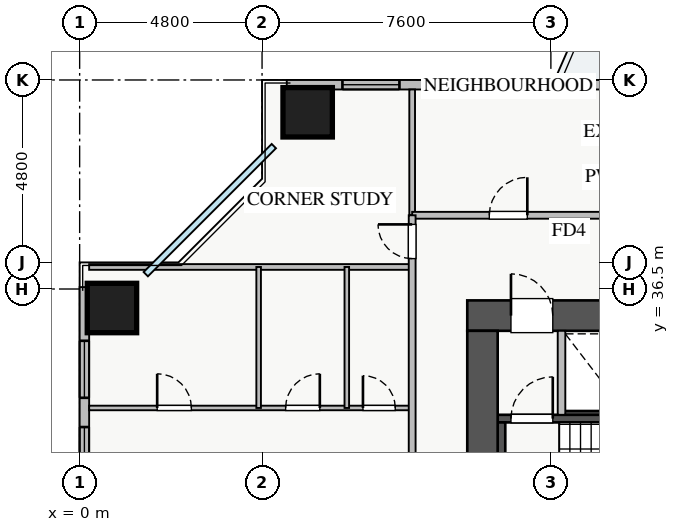
"""IFC4 building model, lengths in metres.
Left out: names, types, materials, properties, quantities, classifications, styles, units other than length and angle.
Written with IfcOpenShell. Run it as: python <this file> out.ifc"""

import sys

from ifc_helpers import new_model, si_unit, direction, frame, frame_2d, origin, origin_2d, place, context, subcontext, project, spatial, rectangle, extrude, source, transform, mapped, element, fill, save


model = new_model("IFC4")
c1 = context("Model", 3, precision=1e-05, world=origin(), true_north=direction((0.0, 1.0)))
c2 = subcontext(c1, "Body", "Model", "MODEL_VIEW")
j1 = project(units=[si_unit("LENGTHUNIT", "METRE"), si_unit("PLANEANGLEUNIT", "RADIAN")], contexts=[c1])
p1 = place(None, origin())
s1 = spatial("IfcSite", under=j1, at=p1, CompositionType="ELEMENT")
p2 = place(p1, origin())
s2 = spatial("IfcBuilding", under=s1, at=p2, CompositionType="ELEMENT")
p3 = place(p2, frame((0.0, 0.0, 66.5)))
s3 = spatial("IfcBuildingStorey", under=s2, at=p3, CompositionType="ELEMENT", Elevation=66.5)
p4 = place(p3, frame((12.68, 33.2, 0.0), z_axis=(0.0, 0.0, 1.0), x_axis=(1.0, 0.0, 0.0)))
e1 = element("IfcWall", 1, at=p4, inside=s3, PredefinedType="SHEAR", context=c2, shape_type="SweptSolid", body=[
    extrude(rectangle(XDim=1.94, YDim=0.18, at=frame_2d((0.97, 0.0))), origin(), (0.0, 0.0, 1.0), 3.07),
])
p5 = place(p3, frame((11.0, 33.09, 0.0), z_axis=(0.0, 0.0, 1.0), x_axis=(1.0, 0.0, 0.0)))
e2 = element("IfcWall", 2, at=p5, inside=s3, PredefinedType="SHEAR", context=c2, shape_type="SweptSolid", body=[
    extrude(rectangle(XDim=7.15, YDim=0.2, at=frame_2d((3.575, 0.0))), origin(), (0.0, 0.0, 1.0), 3.25),
])
p6 = place(p5, frame((0.35, 0.0, 0.0)))
e3 = element("IfcOpeningElement", 3, at=p6, cuts=e2, PredefinedType="OPENING", context=c2, shape_type="SweptSolid", body=[
    extrude(rectangle(XDim=1.1, YDim=2.05, at=frame_2d((0.55, 1.025))), frame((0.0, 0.11, 0.0), z_axis=(0.0, -1.0, 0.0), x_axis=(1.0, 0.0, 0.0)), (0.0, 0.0, 1.0), 0.22),
])
p7 = place(p3, frame((11.1, 30.05, 0.0), z_axis=(0.0, 0.0, 1.0), x_axis=(0.0, 1.0, 0.0)))
e4 = element("IfcWall", 4, at=p7, inside=s3, PredefinedType="SHEAR", context=c2, shape_type="SweptSolid", body=[
    extrude(rectangle(XDim=2.94, YDim=0.2, at=frame_2d((1.47, 0.0))), origin(), (0.0, 0.0, 1.0), 3.25),
])
p8 = place(p3, frame((10.2, 35.8, 0.0), z_axis=(0.0, 0.0, 1.0), x_axis=(1.0, 0.0, 0.0)))
e5 = element("IfcWall", 5, at=p8, inside=s3, PredefinedType="SHEAR", context=c2, shape_type="SweptSolid", body=[
    extrude(rectangle(XDim=17.6, YDim=0.8, at=frame_2d((8.8, 0.0))), origin(), (0.0, 0.0, 1.0), 3.25),
])
p9 = place(p8, frame((1.15, 0.0, 0.0)))
e6 = element("IfcOpeningElement", 6, at=p9, cuts=e5, PredefinedType="OPENING", context=c2, shape_type="SweptSolid", body=[
    extrude(rectangle(XDim=1.1, YDim=2.05, at=frame_2d((0.55, 1.025))), frame((0.0, 0.41, 0.0), z_axis=(0.0, -1.0, 0.0), x_axis=(1.0, 0.0, 0.0)), (0.0, 0.0, 1.0), 0.82),
])
p10 = place(p8, frame((8.3, 0.0, 0.0)))
e7 = element("IfcOpeningElement", 7, at=p10, cuts=e5, PredefinedType="OPENING", context=c2, shape_type="SweptSolid", body=[
    extrude(rectangle(XDim=1.1, YDim=2.05, at=frame_2d((0.55, 1.025))), frame((0.0, 0.41, 0.0), z_axis=(0.0, -1.0, 0.0), x_axis=(1.0, 0.0, 0.0)), (0.0, 0.0, 1.0), 0.82),
])
p11 = place(p8, frame((10.05, 0.0, 0.0)))
e8 = element("IfcOpeningElement", 8, at=p11, cuts=e5, PredefinedType="OPENING", context=c2, shape_type="SweptSolid", body=[
    extrude(rectangle(XDim=1.1, YDim=2.05, at=frame_2d((0.55, 1.025))), frame((0.0, 0.41, 0.0), z_axis=(0.0, -1.0, 0.0), x_axis=(1.0, 0.0, 0.0)), (0.0, 0.0, 1.0), 0.82),
])
p12 = place(p8, frame((14.74, 0.0, 0.0)))
e9 = element("IfcOpeningElement", 9, at=p12, cuts=e5, PredefinedType="OPENING", context=c2, shape_type="SweptSolid", body=[
    extrude(rectangle(XDim=1.0, YDim=2.05, at=frame_2d((0.5, 1.025))), frame((0.0, 0.41, 0.0), z_axis=(0.0, -1.0, 0.0), x_axis=(1.0, 0.0, 0.0)), (0.0, 0.0, 1.0), 0.82),
])
p13 = place(p8, frame((12.585, 0.0, 0.0)))
e10 = element("IfcOpeningElement", 10, at=p13, cuts=e5, PredefinedType="OPENING", context=c2, shape_type="SweptSolid", body=[
    extrude(rectangle(XDim=1.0, YDim=2.05, at=frame_2d((0.5, 1.025))), frame((0.0, 0.41, 0.0), z_axis=(0.0, -1.0, 0.0), x_axis=(1.0, 0.0, 0.0)), (0.0, 0.0, 1.0), 0.82),
])
p14 = place(p3, frame((10.6, 29.8, 0.0), z_axis=(0.0, 0.0, 1.0), x_axis=(0.0, 1.0, 0.0)))
e11 = element("IfcWall", 11, at=p14, inside=s3, PredefinedType="SHEAR", context=c2, shape_type="SweptSolid", body=[
    extrude(rectangle(XDim=5.6, YDim=0.8, at=frame_2d((2.8, 0.0))), origin(), (0.0, 0.0, 1.0), 3.25),
])
m1 = source(origin(), c2, "Body", "SweptSolid", [
    extrude(rectangle(XDim=1.3, YDim=1.3, at=origin_2d()), origin(), (0.0, 0.0, 1.0), 3.25),
])
for number, where, z_axis, x_axis in (
    (12, (6.0, 41.15, 0.0), (0.0, 0.0, 1.0), (1.0, 0.0, 0.0)),
    (13, (0.85, 36.0, 0.0), (0.0, 0.0, 1.0), (1.0, 0.0, 0.0)),
):
    element("IfcColumn", number, at=place(p3, frame(where, z_axis=z_axis, x_axis=x_axis)), inside=s3, PredefinedType="COLUMN", context=c2, shape_type="MappedRepresentation", body=[
        mapped(m1, transform((0.0, 0.0, 0.0), x_axis=(1.0, 0.0, 0.0), y_axis=(0.0, 1.0, 0.0), z_axis=(0.0, 0.0, 1.0), scale=1.0)),
    ])
p15 = place(p3, frame((5.45, 41.875, 0.0), z_axis=(0.0, 0.0, 1.0), x_axis=(1.0, 0.0, 0.0)))
e14 = element("IfcWall", 14, at=p15, inside=s3, PredefinedType="STANDARD", context=c2, shape_type="SweptSolid", body=[
    extrude(rectangle(XDim=27.1, YDim=0.25, at=frame_2d((13.55, 0.0))), origin(), (0.0, 0.0, 1.0), 2.61),
])
p16 = place(p15, frame((14.4, 0.0, 0.0)))
e15 = element("IfcOpeningElement", 15, at=p16, cuts=e14, PredefinedType="OPENING", context=c2, shape_type="SweptSolid", body=[
    extrude(rectangle(XDim=1.2, YDim=2.1, at=frame_2d((0.6, 1.05))), frame((0.0, 0.135, 0.0), z_axis=(0.0, -1.0, 0.0), x_axis=(1.0, 0.0, 0.0)), (0.0, 0.0, 1.0), 0.27),
])
p17 = place(p15, frame((1.465, 0.0, 0.9)))
e16 = element("IfcOpeningElement", 16, at=p17, cuts=e14, PredefinedType="OPENING", context=c2, shape_type="SweptSolid", body=[
    extrude(rectangle(XDim=1.5, YDim=1.5, at=frame_2d((0.75, 0.75))), frame((0.0, 0.135, 0.0), z_axis=(0.0, -1.0, 0.0), x_axis=(1.0, 0.0, 0.0)), (0.0, 0.0, 1.0), 0.27),
])
p18 = place(p15, frame((9.263, 0.0, 0.9)))
e17 = element("IfcOpeningElement", 17, at=p18, cuts=e14, PredefinedType="OPENING", context=c2, shape_type="SweptSolid", body=[
    extrude(rectangle(XDim=1.8, YDim=1.45, at=frame_2d((0.9, 0.725))), frame((0.0, 0.135, 0.0), z_axis=(0.0, -1.0, 0.0), x_axis=(1.0, 0.0, 0.0)), (0.0, 0.0, 1.0), 0.27),
])
p19 = place(p15, frame((17.93, 0.0, 0.9)))
e18 = element("IfcOpeningElement", 18, at=p19, cuts=e14, PredefinedType="OPENING", context=c2, shape_type="SweptSolid", body=[
    extrude(rectangle(XDim=1.5, YDim=1.5, at=frame_2d((0.75, 0.75))), frame((0.0, 0.135, 0.0), z_axis=(0.0, -1.0, 0.0), x_axis=(1.0, 0.0, 0.0)), (0.0, 0.0, 1.0), 0.27),
])
p20 = place(p15, frame((22.663, 0.0, 0.9)))
e19 = element("IfcOpeningElement", 19, at=p20, cuts=e14, PredefinedType="OPENING", context=c2, shape_type="SweptSolid", body=[
    extrude(rectangle(XDim=2.1, YDim=1.48, at=frame_2d((1.05, 0.74))), frame((0.0, 0.135, 0.0), z_axis=(0.0, -1.0, 0.0), x_axis=(1.0, 0.0, 0.0)), (0.0, 0.0, 1.0), 0.27),
])
p21 = place(p15, frame((4.63, 0.0, 0.9)))
e20 = element("IfcOpeningElement", 20, at=p21, cuts=e14, PredefinedType="OPENING", context=c2, shape_type="SweptSolid", body=[
    extrude(rectangle(XDim=2.4, YDim=1.5, at=frame_2d((1.2, 0.75))), frame((0.0, 0.135, 0.0), z_axis=(0.0, -1.0, 0.0), x_axis=(1.0, 0.0, 0.0)), (0.0, 0.0, 1.0), 0.27),
])
p22 = place(p3, frame((0.125, 9.45, 0.0), z_axis=(0.0, 0.0, 1.0), x_axis=(0.0, 1.0, 0.0)))
e21 = element("IfcWall", 21, at=p22, inside=s3, PredefinedType="STANDARD", context=c2, shape_type="SweptSolid", body=[
    extrude(rectangle(XDim=27.1, YDim=0.25, at=frame_2d((13.55, 0.0))), origin(), (0.0, 0.0, 1.0), 2.61),
])
p23 = place(p22, frame((14.4, 0.0, 0.0)))
e22 = element("IfcOpeningElement", 22, at=p23, cuts=e21, PredefinedType="OPENING", context=c2, shape_type="SweptSolid", body=[
    extrude(rectangle(XDim=1.2, YDim=2.1, at=frame_2d((0.6, 1.05))), frame((0.0, 0.135, 0.0), z_axis=(0.0, -1.0, 0.0), x_axis=(1.0, 0.0, 0.0)), (0.0, 0.0, 1.0), 0.27),
])
p24 = place(p22, frame((1.417, 0.0, 0.9)))
e23 = element("IfcOpeningElement", 23, at=p24, cuts=e21, PredefinedType="OPENING", context=c2, shape_type="SweptSolid", body=[
    extrude(rectangle(XDim=1.2, YDim=1.4, at=frame_2d((0.6, 0.7))), frame((0.0, 0.135, 0.0), z_axis=(0.0, -1.0, 0.0), x_axis=(1.0, 0.0, 0.0)), (0.0, 0.0, 1.0), 0.27),
])
p25 = place(p22, frame((24.188, 0.0, 0.9)))
e24 = element("IfcOpeningElement", 24, at=p25, cuts=e21, PredefinedType="OPENING", context=c2, shape_type="SweptSolid", body=[
    extrude(rectangle(XDim=1.5, YDim=1.5, at=frame_2d((0.75, 0.75))), frame((0.0, 0.135, 0.0), z_axis=(0.0, -1.0, 0.0), x_axis=(1.0, 0.0, 0.0)), (0.0, 0.0, 1.0), 0.27),
])
p26 = place(p22, frame((3.722, 0.0, 0.9)))
e25 = element("IfcOpeningElement", 25, at=p26, cuts=e21, PredefinedType="OPENING", context=c2, shape_type="SweptSolid", body=[
    extrude(rectangle(XDim=2.4, YDim=1.5, at=frame_2d((1.2, 0.75))), frame((0.0, 0.135, 0.0), z_axis=(0.0, -1.0, 0.0), x_axis=(1.0, 0.0, 0.0)), (0.0, 0.0, 1.0), 0.27),
])
p27 = place(p22, frame((21.018, 0.0, 0.9)))
e26 = element("IfcOpeningElement", 26, at=p27, cuts=e21, PredefinedType="OPENING", context=c2, shape_type="SweptSolid", body=[
    extrude(rectangle(XDim=2.4, YDim=1.5, at=frame_2d((1.2, 0.75))), frame((0.0, 0.135, 0.0), z_axis=(0.0, -1.0, 0.0), x_axis=(1.0, 0.0, 0.0)), (0.0, 0.0, 1.0), 0.27),
])
p28 = place(p22, frame((18.6, 0.0, 0.9)))
e27 = element("IfcOpeningElement", 27, at=p28, cuts=e21, PredefinedType="OPENING", context=c2, shape_type="SweptSolid", body=[
    extrude(rectangle(XDim=0.9, YDim=1.2, at=frame_2d((0.45, 0.6))), frame((0.0, 0.135, 0.0), z_axis=(0.0, -1.0, 0.0), x_axis=(1.0, 0.0, 0.0)), (0.0, 0.0, 1.0), 0.27),
])
p29 = place(p3, frame((12.68, 33.19, 0.0), z_axis=(0.0, 0.0, 1.0), x_axis=(0.0, 1.0, 0.0)))
e28 = element("IfcWall", 28, at=p29, inside=s3, PredefinedType="PARTITIONING", context=c2, shape_type="SweptSolid", body=[
    extrude(rectangle(XDim=2.21, YDim=0.2, at=frame_2d((1.105, 0.0))), origin(), (0.0, 0.0, 1.0), 3.07),
])
p30 = place(p3, frame((8.75, 38.44, 0.0), z_axis=(0.0, 0.0, 1.0), x_axis=(0.0, 1.0, 0.0)))
e29 = element("IfcWall", 29, at=p30, inside=s3, PredefinedType="PARTITIONING", context=c2, shape_type="SweptSolid", body=[
    extrude(rectangle(XDim=3.31, YDim=0.15, at=frame_2d((1.655, 0.0))), origin(), (0.0, 0.0, 1.0), 3.07),
])
p31 = place(p3, frame((8.75, 38.44, 0.0), z_axis=(0.0, 0.0, 1.0), x_axis=(1.0, 0.0, 0.0)))
e30 = element("IfcWall", 30, at=p31, inside=s3, PredefinedType="PARTITIONING", context=c2, shape_type="SweptSolid", body=[
    extrude(rectangle(XDim=23.61, YDim=0.18, at=frame_2d((11.805, 0.0))), origin(), (0.0, 0.0, 1.0), 3.07),
])
p32 = place(p31, frame((2.03, 0.0, 0.0)))
e31 = element("IfcOpeningElement", 31, at=p32, cuts=e30, PredefinedType="OPENING", context=c2, shape_type="SweptSolid", body=[
    extrude(rectangle(XDim=1.0, YDim=2.05, at=frame_2d((0.5, 1.025))), frame((0.0, 0.1, 0.0), z_axis=(0.0, -1.0, 0.0), x_axis=(1.0, 0.0, 0.0)), (0.0, 0.0, 1.0), 0.2),
])
p33 = place(p31, frame((8.555, 0.0, 0.0)))
e32 = element("IfcOpeningElement", 32, at=p33, cuts=e30, PredefinedType="OPENING", context=c2, shape_type="SweptSolid", body=[
    extrude(rectangle(XDim=1.0, YDim=2.05, at=frame_2d((0.5, 1.025))), frame((0.0, 0.1, 0.0), z_axis=(0.0, -1.0, 0.0), x_axis=(1.0, 0.0, 0.0)), (0.0, 0.0, 1.0), 0.2),
])
p34 = place(p31, frame((14.88, 0.0, 0.0)))
e33 = element("IfcOpeningElement", 33, at=p34, cuts=e30, PredefinedType="OPENING", context=c2, shape_type="SweptSolid", body=[
    extrude(rectangle(XDim=1.0, YDim=2.05, at=frame_2d((0.5, 1.025))), frame((0.0, 0.1, 0.0), z_axis=(0.0, -1.0, 0.0), x_axis=(1.0, 0.0, 0.0)), (0.0, 0.0, 1.0), 0.2),
])
p35 = place(p31, frame((20.16, 0.0, 0.0)))
e34 = element("IfcOpeningElement", 34, at=p35, cuts=e30, PredefinedType="OPENING", context=c2, shape_type="SweptSolid", body=[
    extrude(rectangle(XDim=1.0, YDim=2.05, at=frame_2d((0.5, 1.025))), frame((0.0, 0.1, 0.0), z_axis=(0.0, -1.0, 0.0), x_axis=(1.0, 0.0, 0.0)), (0.0, 0.0, 1.0), 0.2),
])
p36 = place(p3, frame((0.25, 37.08, 0.0), z_axis=(0.0, 0.0, 1.0), x_axis=(1.0, 0.0, 0.0)))
e35 = element("IfcWall", 35, at=p36, inside=s3, PredefinedType="PARTITIONING", context=c2, shape_type="SweptSolid", body=[
    extrude(rectangle(XDim=8.5, YDim=0.15, at=frame_2d((4.25, 0.0))), origin(), (0.0, 0.0, 1.0), 3.07),
])
p37 = place(p3, frame((0.25, 33.37, 0.0), z_axis=(0.0, 0.0, 1.0), x_axis=(1.0, 0.0, 0.0)))
e36 = element("IfcWall", 36, at=p37, inside=s3, PredefinedType="PLUMBINGWALL", context=c2, shape_type="SweptSolid", body=[
    extrude(rectangle(XDim=8.5, YDim=0.12, at=frame_2d((4.25, 0.0))), origin(), (0.0, 0.0, 1.0), 3.07),
])
p38 = place(p37, frame((1.79, 0.0, 0.0)))
e37 = element("IfcOpeningElement", 37, at=p38, cuts=e36, PredefinedType="OPENING", context=c2, shape_type="SweptSolid", body=[
    extrude(rectangle(XDim=0.9, YDim=2.05, at=frame_2d((0.45, 1.025))), frame((0.0, 0.07, 0.0), z_axis=(0.0, -1.0, 0.0), x_axis=(1.0, 0.0, 0.0)), (0.0, 0.0, 1.0), 0.14),
])
p39 = place(p37, frame((5.17, 0.0, 0.0)))
e38 = element("IfcOpeningElement", 38, at=p39, cuts=e36, PredefinedType="OPENING", context=c2, shape_type="SweptSolid", body=[
    extrude(rectangle(XDim=0.9, YDim=2.05, at=frame_2d((0.45, 1.025))), frame((0.0, 0.07, 0.0), z_axis=(0.0, -1.0, 0.0), x_axis=(1.0, 0.0, 0.0)), (0.0, 0.0, 1.0), 0.14),
])
p40 = place(p37, frame((7.205, 0.0, 0.0)))
e39 = element("IfcOpeningElement", 39, at=p40, cuts=e36, PredefinedType="OPENING", context=c2, shape_type="SweptSolid", body=[
    extrude(rectangle(XDim=0.85, YDim=2.05, at=frame_2d((0.425, 1.025))), frame((0.0, 0.07, 0.0), z_axis=(0.0, -1.0, 0.0), x_axis=(1.0, 0.0, 0.0)), (0.0, 0.0, 1.0), 0.14),
])
for number, where, z_axis, x_axis in (
    (40, (4.71, 33.37, 0.0), (0.0, 0.0, 1.0), (0.0, 1.0, 0.0)),
    (41, (7.03, 33.37, 0.0), (0.0, 0.0, 1.0), (0.0, 1.0, 0.0)),
):
    element("IfcWall", number, at=place(p3, frame(where, z_axis=z_axis, x_axis=x_axis)), inside=s3, PredefinedType="PLUMBINGWALL", context=c2, shape_type="SweptSolid", body=[
        extrude(rectangle(XDim=3.71, YDim=0.12, at=frame_2d((1.855, 0.0))), origin(), (0.0, 0.0, 1.0), 3.07),
    ])
p41 = place(p3, frame((8.75, 7.21, 0.0), z_axis=(0.0, 0.0, 1.0), x_axis=(0.0, 1.0, 0.0)))
e42 = element("IfcWall", 42, at=p41, inside=s3, PredefinedType="PARTITIONING", context=c2, shape_type="SweptSolid", body=[
    extrude(rectangle(XDim=31.23, YDim=0.18, at=frame_2d((15.615, 0.0))), origin(), (0.0, 0.0, 1.0), 3.07),
])
p42 = place(p41, frame((30.09, 0.0, 0.0)))
e43 = element("IfcOpeningElement", 43, at=p42, cuts=e42, PredefinedType="OPENING", context=c2, shape_type="SweptSolid", body=[
    extrude(rectangle(XDim=0.9, YDim=2.05, at=frame_2d((0.45, 1.025))), frame((0.0, 0.1, 0.0), z_axis=(0.0, -1.0, 0.0), x_axis=(1.0, 0.0, 0.0)), (0.0, 0.0, 1.0), 0.2),
])
p43 = place(p41, frame((0.24, 0.0, 0.0)))
e44 = element("IfcOpeningElement", 44, at=p43, cuts=e42, PredefinedType="OPENING", context=c2, shape_type="SweptSolid", body=[
    extrude(rectangle(XDim=0.9, YDim=2.05, at=frame_2d((0.45, 1.025))), frame((0.0, 0.1, 0.0), z_axis=(0.0, -1.0, 0.0), x_axis=(1.0, 0.0, 0.0)), (0.0, 0.0, 1.0), 0.2),
])
p44 = place(p41, frame((2.555, 0.0, 0.0)))
e45 = element("IfcOpeningElement", 45, at=p44, cuts=e42, PredefinedType="OPENING", context=c2, shape_type="SweptSolid", body=[
    extrude(rectangle(XDim=1.0, YDim=2.05, at=frame_2d((0.5, 1.025))), frame((0.0, 0.1, 0.0), z_axis=(0.0, -1.0, 0.0), x_axis=(1.0, 0.0, 0.0)), (0.0, 0.0, 1.0), 0.2),
])
p45 = place(p41, frame((11.91, 0.0, 0.0)))
e46 = element("IfcOpeningElement", 46, at=p45, cuts=e42, PredefinedType="OPENING", context=c2, shape_type="SweptSolid", body=[
    extrude(rectangle(XDim=1.0, YDim=2.05, at=frame_2d((0.5, 1.025))), frame((0.0, 0.1, 0.0), z_axis=(0.0, -1.0, 0.0), x_axis=(1.0, 0.0, 0.0)), (0.0, 0.0, 1.0), 0.2),
])
p46 = place(p41, frame((17.425, 0.0, 0.0)))
e47 = element("IfcOpeningElement", 47, at=p46, cuts=e42, PredefinedType="OPENING", context=c2, shape_type="SweptSolid", body=[
    extrude(rectangle(XDim=1.0, YDim=2.05, at=frame_2d((0.5, 1.025))), frame((0.0, 0.1, 0.0), z_axis=(0.0, -1.0, 0.0), x_axis=(1.0, 0.0, 0.0)), (0.0, 0.0, 1.0), 0.2),
])
p47 = place(p41, frame((23.76, 0.0, 0.0)))
e48 = element("IfcOpeningElement", 48, at=p47, cuts=e42, PredefinedType="OPENING", context=c2, shape_type="SweptSolid", body=[
    extrude(rectangle(XDim=1.0, YDim=2.05, at=frame_2d((0.5, 1.025))), frame((0.0, 0.1, 0.0), z_axis=(0.0, -1.0, 0.0), x_axis=(1.0, 0.0, 0.0)), (0.0, 0.0, 1.0), 0.2),
])
m2 = source(origin(), c2, "Body", "SweptSolid", [
    extrude(rectangle(XDim=1.5, YDim=1.5, at=frame_2d((0.75, 0.75))), frame((0.0, 0.03, 0.0), z_axis=(0.0, -1.0, 0.0), x_axis=(1.0, 0.0, 0.0)), (0.0, 0.0, 1.0), 0.06),
])
p48 = place(p17, origin())
e49 = element("IfcWindow", 49, at=p48, inside=s3, PartitioningType="TRIPLE_PANEL_VERTICAL", PredefinedType="WINDOW", context=c2, shape_type="MappedRepresentation", body=[
    mapped(m2, transform((0.0, 0.0, 0.0), x_axis=(1.0, 0.0, 0.0), y_axis=(0.0, 1.0, 0.0), z_axis=(0.0, 0.0, 1.0), scale=1.0)),
])
fill(e16, e49)
p49 = place(p25, origin())
e50 = element("IfcWindow", 50, at=p49, inside=s3, PartitioningType="TRIPLE_PANEL_VERTICAL", PredefinedType="WINDOW", context=c2, shape_type="MappedRepresentation", body=[
    mapped(m2, transform((0.0, 0.0, 0.0), x_axis=(1.0, 0.0, 0.0), y_axis=(0.0, 1.0, 0.0), z_axis=(0.0, 0.0, 1.0), scale=1.0)),
])
fill(e24, e50)
m3 = source(origin(), c2, "Body", "SweptSolid", [
    extrude(rectangle(XDim=1.1, YDim=2.05, at=frame_2d((0.55, 1.025))), frame((0.0, 0.025, 0.0), z_axis=(0.0, -1.0, 0.0), x_axis=(1.0, 0.0, 0.0)), (0.0, 0.0, 1.0), 0.05),
])
p50 = place(p9, origin())
e51 = element("IfcDoor", 51, at=p50, inside=s3, OperationType="SINGLE_SWING_LEFT", PredefinedType="DOOR", context=c2, shape_type="MappedRepresentation", body=[
    mapped(m3, transform((0.0, 0.0, 0.0), x_axis=(1.0, 0.0, 0.0), y_axis=(0.0, 1.0, 0.0), z_axis=(0.0, 0.0, 1.0), scale=1.0)),
])
fill(e6, e51)
p51 = place(p6, origin())
e52 = element("IfcDoor", 52, at=p51, inside=s3, OperationType="SINGLE_SWING_RIGHT", PredefinedType="DOOR", context=c2, shape_type="MappedRepresentation", body=[
    mapped(m3, transform((0.0, 0.0, 0.0), x_axis=(1.0, 0.0, 0.0), y_axis=(0.0, 1.0, 0.0), z_axis=(0.0, 0.0, 1.0), scale=1.0)),
])
fill(e3, e52)
m4 = source(origin(), c2, "Body", "SweptSolid", [
    extrude(rectangle(XDim=1.0, YDim=2.05, at=frame_2d((0.5, 1.025))), frame((0.0, 0.025, 0.0), z_axis=(0.0, -1.0, 0.0), x_axis=(1.0, 0.0, 0.0)), (0.0, 0.0, 1.0), 0.05),
])
p52 = place(p32, origin())
e53 = element("IfcDoor", 53, at=p52, inside=s3, OperationType="SINGLE_SWING_RIGHT", PredefinedType="DOOR", context=c2, shape_type="MappedRepresentation", body=[
    mapped(m4, transform((0.0, 0.0, 0.0), x_axis=(1.0, 0.0, 0.0), y_axis=(0.0, 1.0, 0.0), z_axis=(0.0, 0.0, 1.0), scale=1.0)),
])
fill(e31, e53)
m5 = source(origin(), c2, "Body", "SweptSolid", [
    extrude(rectangle(XDim=0.9, YDim=2.05, at=frame_2d((0.45, 1.025))), frame((0.0, 0.025, 0.0), z_axis=(0.0, -1.0, 0.0), x_axis=(1.0, 0.0, 0.0)), (0.0, 0.0, 1.0), 0.05),
])
p53 = place(p38, origin())
e54 = element("IfcDoor", 54, at=p53, inside=s3, OperationType="SINGLE_SWING_LEFT", PredefinedType="DOOR", context=c2, shape_type="MappedRepresentation", body=[
    mapped(m5, transform((0.0, 0.0, 0.0), x_axis=(1.0, 0.0, 0.0), y_axis=(0.0, 1.0, 0.0), z_axis=(0.0, 0.0, 1.0), scale=1.0)),
])
fill(e37, e54)
p54 = place(p39, origin())
e55 = element("IfcDoor", 55, at=p54, inside=s3, OperationType="SINGLE_SWING_RIGHT", PredefinedType="DOOR", context=c2, shape_type="MappedRepresentation", body=[
    mapped(m5, transform((0.0, 0.0, 0.0), x_axis=(1.0, 0.0, 0.0), y_axis=(0.0, 1.0, 0.0), z_axis=(0.0, 0.0, 1.0), scale=1.0)),
])
fill(e38, e55)
m6 = source(origin(), c2, "Body", "SweptSolid", [
    extrude(rectangle(XDim=0.85, YDim=2.05, at=frame_2d((0.425, 1.025))), frame((0.0, 0.025, 0.0), z_axis=(0.0, -1.0, 0.0), x_axis=(1.0, 0.0, 0.0)), (0.0, 0.0, 1.0), 0.05),
])
p55 = place(p40, origin())
e56 = element("IfcDoor", 56, at=p55, inside=s3, OperationType="SINGLE_SWING_LEFT", PredefinedType="DOOR", context=c2, shape_type="MappedRepresentation", body=[
    mapped(m6, transform((0.0, 0.0, 0.0), x_axis=(1.0, 0.0, 0.0), y_axis=(0.0, 1.0, 0.0), z_axis=(0.0, 0.0, 1.0), scale=1.0)),
])
fill(e39, e56)
p56 = place(p42, origin())
e57 = element("IfcDoor", 57, at=p56, inside=s3, OperationType="SINGLE_SWING_RIGHT", PredefinedType="DOOR", context=c2, shape_type="MappedRepresentation", body=[
    mapped(m5, transform((0.0, 0.0, 0.0), x_axis=(1.0, 0.0, 0.0), y_axis=(0.0, 1.0, 0.0), z_axis=(0.0, 0.0, 1.0), scale=1.0)),
])
fill(e43, e57)
m7 = source(origin(), c2, "Body", "SweptSolid", [
    extrude(rectangle(XDim=2.4, YDim=1.5, at=frame_2d((1.2, 0.75))), frame((0.0, 0.03, 0.0), z_axis=(0.0, -1.0, 0.0), x_axis=(1.0, 0.0, 0.0)), (0.0, 0.0, 1.0), 0.06),
])
p57 = place(p21, origin())
e58 = element("IfcWindow", 58, at=p57, inside=s3, PartitioningType="TRIPLE_PANEL_VERTICAL", PredefinedType="WINDOW", context=c2, shape_type="MappedRepresentation", body=[
    mapped(m7, transform((0.0, 0.0, 0.0), x_axis=(1.0, 0.0, 0.0), y_axis=(0.0, 1.0, 0.0), z_axis=(0.0, 0.0, 1.0), scale=1.0)),
])
fill(e20, e58)
p58 = place(p27, origin())
e59 = element("IfcWindow", 59, at=p58, inside=s3, PartitioningType="TRIPLE_PANEL_VERTICAL", PredefinedType="WINDOW", context=c2, shape_type="MappedRepresentation", body=[
    mapped(m7, transform((0.0, 0.0, 0.0), x_axis=(1.0, 0.0, 0.0), y_axis=(0.0, 1.0, 0.0), z_axis=(0.0, 0.0, 1.0), scale=1.0)),
])
fill(e26, e59)
save(model, sys.argv[1])
